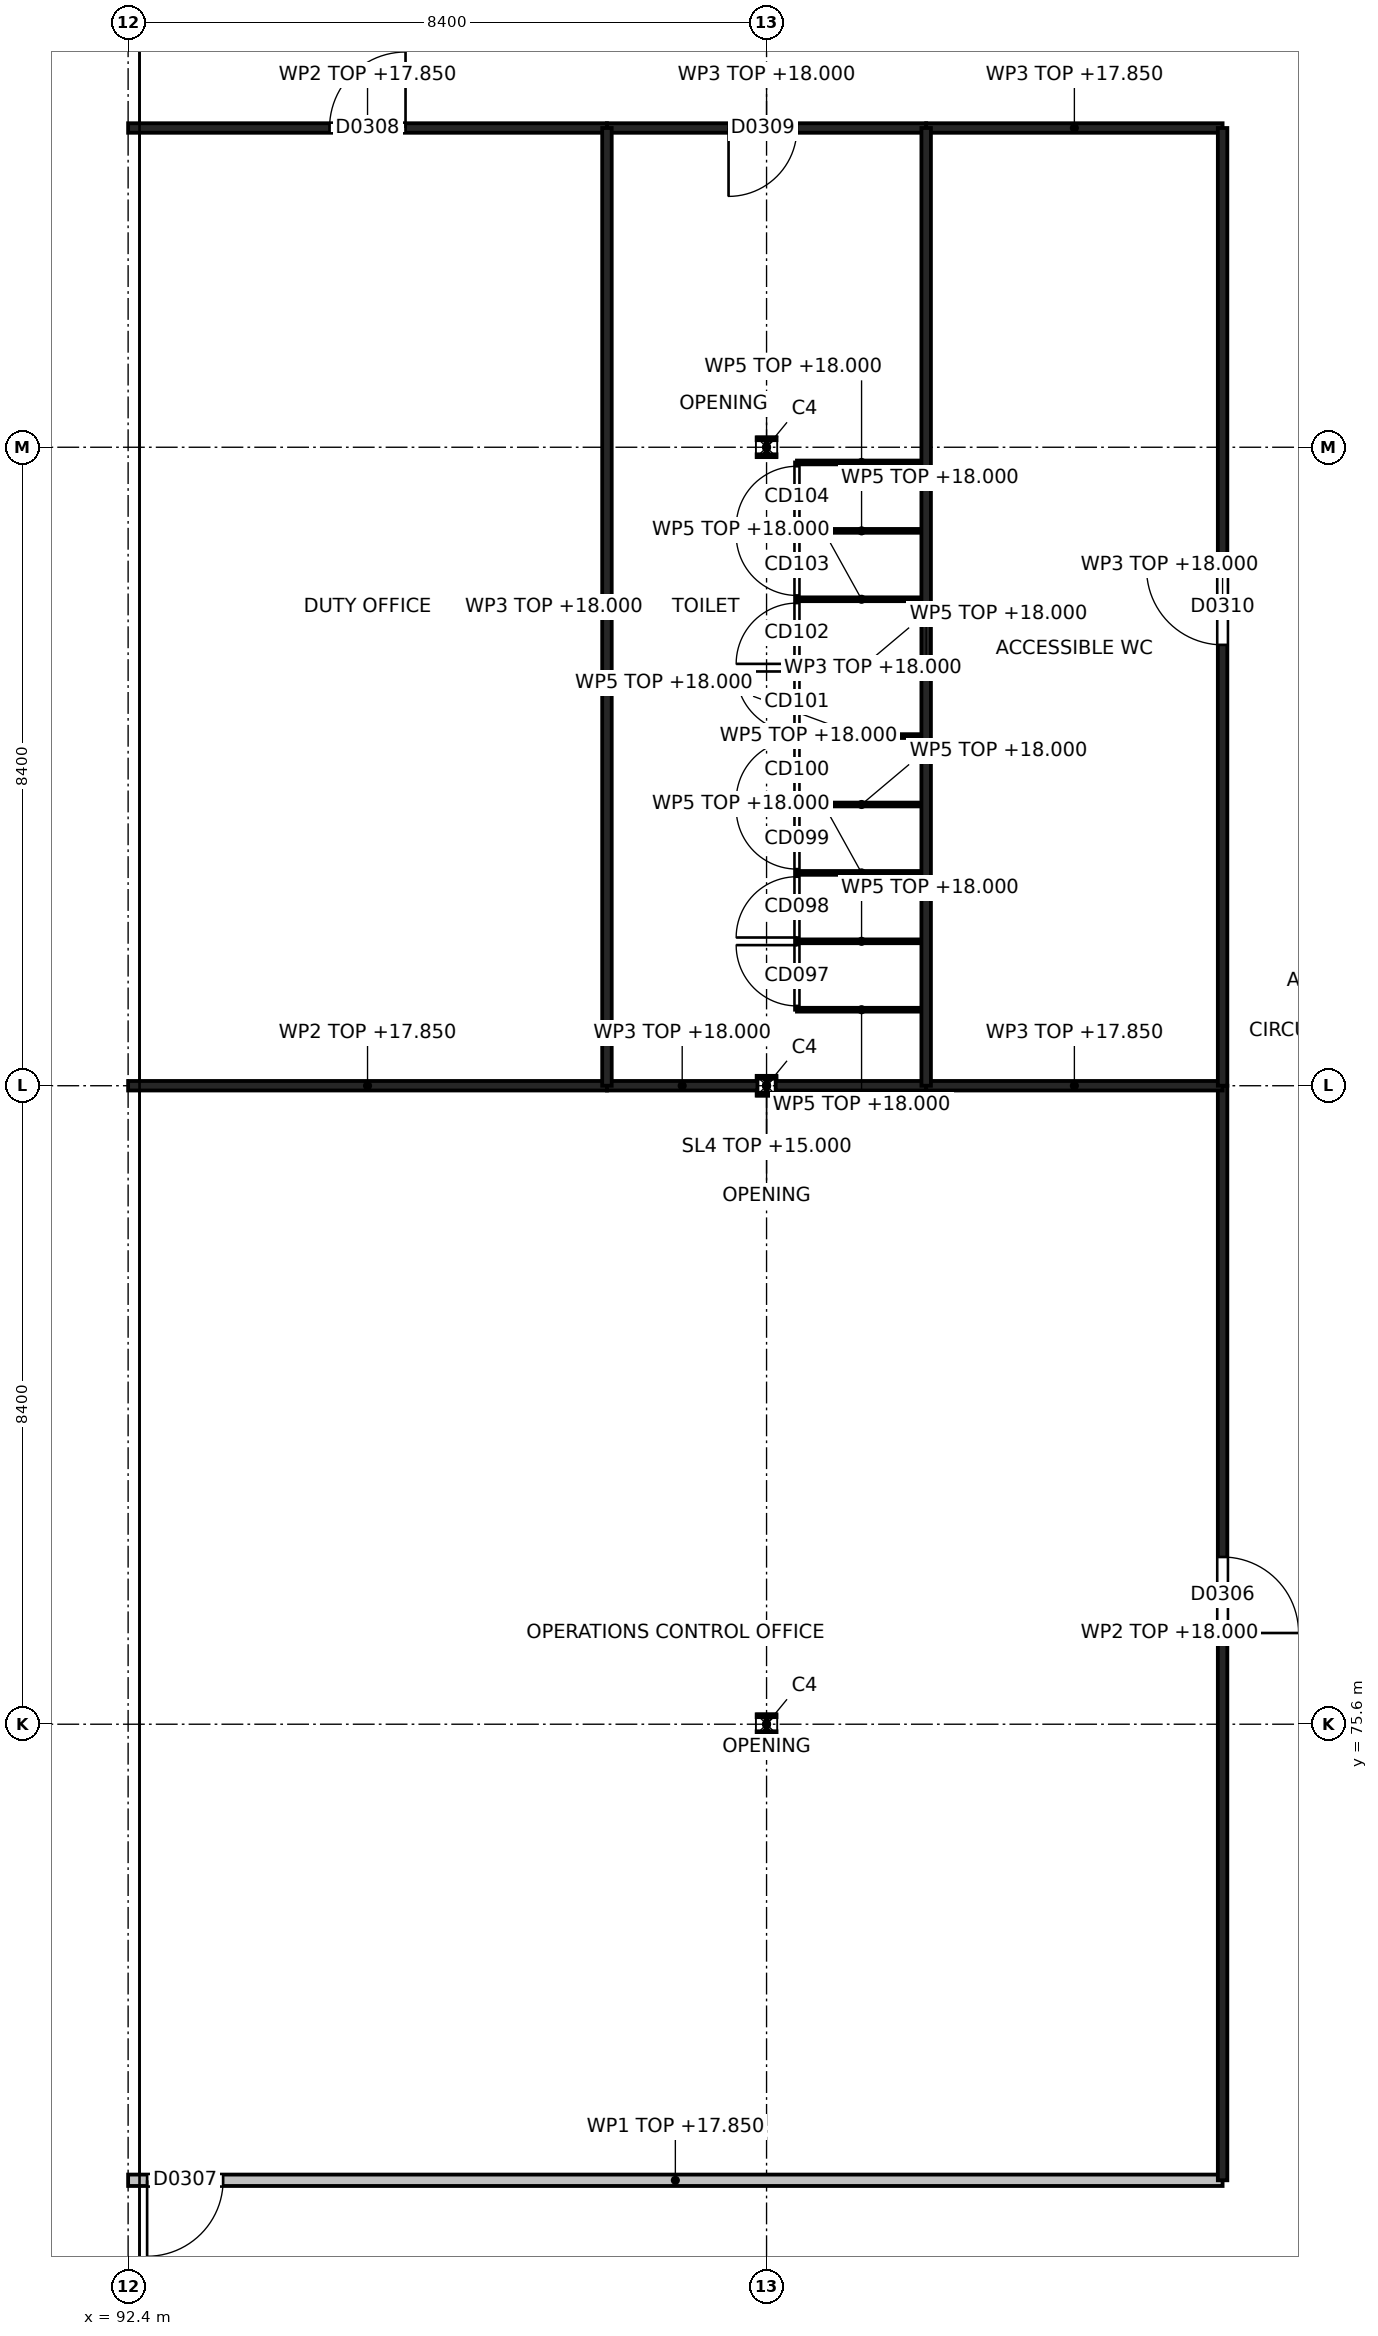
"""IFC4 building model, lengths in metres.
Left out: names, types, materials, properties, quantities, classifications, styles, units other than length and angle.
Written with IfcOpenShell. Run it as: python <this file> out.ifc"""

import sys

from ifc_helpers import new_model, si_unit, direction, frame, frame_2d, origin, origin_2d, place, context, subcontext, project, spatial, rectangle, i_section, extrude, element, fill, save


model = new_model("IFC4")
c1 = context("Model", 3, precision=1e-05, world=origin(), true_north=direction((0.0, 1.0)))
c2 = subcontext(c1, "Body", "Model", "MODEL_VIEW")
j1 = project(units=[si_unit("LENGTHUNIT", "METRE"), si_unit("PLANEANGLEUNIT", "RADIAN")], contexts=[c1])
p1 = place(None, origin())
s1 = spatial("IfcSite", under=j1, at=p1, CompositionType="ELEMENT")
p2 = place(p1, origin())
s2 = spatial("IfcBuilding", under=s1, at=p2, CompositionType="ELEMENT")
p3 = place(p2, frame((0.0, 0.0, 15.0)))
s3 = spatial("IfcBuildingStorey", under=s2, at=p3, CompositionType="ELEMENT", Elevation=15.0)
for number, where, z_axis, x_axis in (
    (1, (100.8, 75.6, 0.0), (0.0, 0.0, 1.0), (1.0, 0.0, 0.0)),
    (2, (100.8, 84.0, 0.0), (0.0, 0.0, 1.0), (1.0, 0.0, 0.0)),
    (3, (100.8, 92.4, 0.0), (0.0, 0.0, 1.0), (1.0, 0.0, 0.0)),
):
    element("IfcColumn", number, at=place(p3, frame(where, z_axis=z_axis, x_axis=x_axis)), inside=s3, PredefinedType="COLUMN", context=c2, shape_type="SweptSolid", body=[
        extrude(i_section(OverallWidth=0.24, OverallDepth=0.24, WebThickness=0.01, FlangeThickness=0.017, at=origin_2d()), origin(), (0.0, 0.0, 1.0), 3.31),
    ])
p4 = place(p3, frame((92.4, 69.6, 0.0), z_axis=(0.0, 0.0, 1.0), x_axis=(1.0, 0.0, 0.0)))
e4 = element("IfcWall", 4, at=p4, inside=s3, PredefinedType="PARTITIONING", context=c2, shape_type="SweptSolid", body=[
    extrude(rectangle(XDim=14.4, YDim=0.15, at=frame_2d((7.2, 0.0))), origin(), (0.0, 0.0, 1.0), 2.85),
])
p5 = place(p4, frame((0.25, 0.0, 0.0)))
e5 = element("IfcOpeningElement", 5, at=p5, cuts=e4, PredefinedType="OPENING", context=c2, shape_type="SweptSolid", body=[
    extrude(rectangle(XDim=1.0, YDim=2.2, at=frame_2d((0.5, 1.1))), frame((0.0, 0.075, 0.0), z_axis=(0.0, -1.0, 0.0), x_axis=(1.0, 0.0, 0.0)), (0.0, 0.0, 1.0), 0.15),
])
p6 = place(p3, frame((106.8, 69.6, 0.0), z_axis=(0.0, 0.0, 1.0), x_axis=(0.0, 1.0, 0.0)))
e6 = element("IfcWall", 6, at=p6, inside=s3, PredefinedType="PARTITIONING", context=c2, shape_type="SweptSolid", body=[
    extrude(rectangle(XDim=14.4, YDim=0.125, at=frame_2d((7.2, 0.0))), origin(), (0.0, 0.0, 1.0), 3.0),
])
p7 = place(p6, frame((7.2, 0.0, 0.0)))
e7 = element("IfcOpeningElement", 7, at=p7, cuts=e6, PredefinedType="OPENING", context=c2, shape_type="SweptSolid", body=[
    extrude(rectangle(XDim=1.0, YDim=2.2, at=frame_2d((0.5, 1.1))), frame((0.0, 0.062, 0.0), z_axis=(0.0, -1.0, 0.0), x_axis=(1.0, 0.0, 0.0)), (0.0, 0.0, 1.0), 0.125),
])
p8 = place(p3, frame((92.4, 84.0, 0.0), z_axis=(0.0, 0.0, 1.0), x_axis=(1.0, 0.0, 0.0)))
e8 = element("IfcWall", 8, at=p8, inside=s3, PredefinedType="PARTITIONING", context=c2, shape_type="SweptSolid", body=[
    extrude(rectangle(XDim=6.3, YDim=0.125, at=frame_2d((3.15, 0.0))), origin(), (0.0, 0.0, 1.0), 2.85),
])
for number, where, z_axis, x_axis in (
    (9, (98.7, 84.0, 0.0), (0.0, 0.0, 1.0), (1.0, 0.0, 0.0)),
    (10, (100.92, 84.0, 0.0), (0.0, 0.0, 1.0), (1.0, 0.0, 0.0)),
):
    element("IfcWall", number, at=place(p3, frame(where, z_axis=z_axis, x_axis=x_axis)), inside=s3, PredefinedType="PARTITIONING", context=c2, shape_type="SweptSolid", body=[
        extrude(rectangle(XDim=1.98, YDim=0.125, at=frame_2d((0.99, 0.0))), origin(), (0.0, 0.0, 1.0), 3.0),
    ])
p9 = place(p3, frame((102.9, 84.0, 0.0), z_axis=(0.0, 0.0, 1.0), x_axis=(1.0, 0.0, 0.0)))
e11 = element("IfcWall", 11, at=p9, inside=s3, PredefinedType="PARTITIONING", context=c2, shape_type="SweptSolid", body=[
    extrude(rectangle(XDim=3.9, YDim=0.125, at=frame_2d((1.95, 0.0))), origin(), (0.0, 0.0, 1.0), 2.85),
])
p10 = place(p3, frame((92.4, 96.6, 0.0), z_axis=(0.0, 0.0, 1.0), x_axis=(1.0, 0.0, 0.0)))
e12 = element("IfcWall", 12, at=p10, inside=s3, PredefinedType="PARTITIONING", context=c2, shape_type="SweptSolid", body=[
    extrude(rectangle(XDim=6.3, YDim=0.125, at=frame_2d((3.15, 0.0))), origin(), (0.0, 0.0, 1.0), 2.85),
])
p11 = place(p10, frame((2.65, 0.0, 0.0)))
e13 = element("IfcOpeningElement", 13, at=p11, cuts=e12, PredefinedType="OPENING", context=c2, shape_type="SweptSolid", body=[
    extrude(rectangle(XDim=1.0, YDim=2.2, at=frame_2d((0.5, 1.1))), frame((0.0, 0.062, 0.0), z_axis=(0.0, -1.0, 0.0), x_axis=(1.0, 0.0, 0.0)), (0.0, 0.0, 1.0), 0.125),
])
p12 = place(p3, frame((98.7, 96.6, 0.0), z_axis=(0.0, 0.0, 1.0), x_axis=(1.0, 0.0, 0.0)))
e14 = element("IfcWall", 14, at=p12, inside=s3, PredefinedType="PARTITIONING", context=c2, shape_type="SweptSolid", body=[
    extrude(rectangle(XDim=4.2, YDim=0.125, at=frame_2d((2.1, 0.0))), origin(), (0.0, 0.0, 1.0), 3.0),
])
p13 = place(p12, frame((1.6, 0.0, 0.0)))
e15 = element("IfcOpeningElement", 15, at=p13, cuts=e14, PredefinedType="OPENING", context=c2, shape_type="SweptSolid", body=[
    extrude(rectangle(XDim=0.9, YDim=2.1, at=frame_2d((0.45, 1.05))), frame((0.0, 0.062, 0.0), z_axis=(0.0, -1.0, 0.0), x_axis=(1.0, 0.0, 0.0)), (0.0, 0.0, 1.0), 0.125),
])
p14 = place(p3, frame((102.9, 96.6, 0.0), z_axis=(0.0, 0.0, 1.0), x_axis=(1.0, 0.0, 0.0)))
e16 = element("IfcWall", 16, at=p14, inside=s3, PredefinedType="PARTITIONING", context=c2, shape_type="SweptSolid", body=[
    extrude(rectangle(XDim=3.9, YDim=0.125, at=frame_2d((1.95, 0.0))), origin(), (0.0, 0.0, 1.0), 2.85),
])
p15 = place(p3, frame((106.8, 84.0, 0.0), z_axis=(0.0, 0.0, 1.0), x_axis=(0.0, 1.0, 0.0)))
e17 = element("IfcWall", 17, at=p15, inside=s3, PredefinedType="PARTITIONING", context=c2, shape_type="SweptSolid", body=[
    extrude(rectangle(XDim=12.6, YDim=0.125, at=frame_2d((6.3, 0.0))), origin(), (0.0, 0.0, 1.0), 3.0),
])
p16 = place(p15, frame((5.8, 0.0, 0.0)))
e18 = element("IfcOpeningElement", 18, at=p16, cuts=e17, PredefinedType="OPENING", context=c2, shape_type="SweptSolid", body=[
    extrude(rectangle(XDim=1.0, YDim=2.1, at=frame_2d((0.5, 1.05))), frame((0.0, 0.062, 0.0), z_axis=(0.0, -1.0, 0.0), x_axis=(1.0, 0.0, 0.0)), (0.0, 0.0, 1.0), 0.125),
])
for number, where, z_axis, x_axis in (
    (19, (98.7, 84.0, 0.0), (0.0, 0.0, 1.0), (0.0, 1.0, 0.0)),
    (20, (102.9, 84.0, 0.0), (0.0, 0.0, 1.0), (0.0, 1.0, 0.0)),
):
    element("IfcWall", number, at=place(p3, frame(where, z_axis=z_axis, x_axis=x_axis)), inside=s3, PredefinedType="PARTITIONING", context=c2, shape_type="SweptSolid", body=[
        extrude(rectangle(XDim=12.6, YDim=0.125, at=frame_2d((6.3, 0.0))), origin(), (0.0, 0.0, 1.0), 3.0),
    ])
p17 = place(p3, frame((101.2, 85.0, 0.0), z_axis=(0.0, 0.0, 1.0), x_axis=(0.0, 1.0, 0.0)))
e21 = element("IfcWall", 21, at=p17, inside=s3, PredefinedType="PARTITIONING", context=c2, shape_type="SweptSolid", body=[
    extrude(rectangle(XDim=7.2, YDim=0.05, at=frame_2d((3.6, 0.0))), origin(), (0.0, 0.0, 1.0), 3.0),
])
p18 = place(p17, frame((0.05, 0.0, 0.0)))
e22 = element("IfcOpeningElement", 22, at=p18, cuts=e21, PredefinedType="OPENING", context=c2, shape_type="SweptSolid", body=[
    extrude(rectangle(XDim=0.8, YDim=2.0, at=frame_2d((0.4, 1.0))), frame((0.0, 0.025, 0.0), z_axis=(0.0, -1.0, 0.0), x_axis=(1.0, 0.0, 0.0)), (0.0, 0.0, 1.0), 0.05),
])
p19 = place(p17, frame((0.95, 0.0, 0.0)))
e23 = element("IfcOpeningElement", 23, at=p19, cuts=e21, PredefinedType="OPENING", context=c2, shape_type="SweptSolid", body=[
    extrude(rectangle(XDim=0.8, YDim=2.0, at=frame_2d((0.4, 1.0))), frame((0.0, 0.025, 0.0), z_axis=(0.0, -1.0, 0.0), x_axis=(1.0, 0.0, 0.0)), (0.0, 0.0, 1.0), 0.05),
])
p20 = place(p17, frame((1.85, 0.0, 0.0)))
e24 = element("IfcOpeningElement", 24, at=p20, cuts=e21, PredefinedType="OPENING", context=c2, shape_type="SweptSolid", body=[
    extrude(rectangle(XDim=0.8, YDim=2.0, at=frame_2d((0.4, 1.0))), frame((0.0, 0.025, 0.0), z_axis=(0.0, -1.0, 0.0), x_axis=(1.0, 0.0, 0.0)), (0.0, 0.0, 1.0), 0.05),
])
p21 = place(p17, frame((2.75, 0.0, 0.0)))
e25 = element("IfcOpeningElement", 25, at=p21, cuts=e21, PredefinedType="OPENING", context=c2, shape_type="SweptSolid", body=[
    extrude(rectangle(XDim=0.8, YDim=2.0, at=frame_2d((0.4, 1.0))), frame((0.0, 0.025, 0.0), z_axis=(0.0, -1.0, 0.0), x_axis=(1.0, 0.0, 0.0)), (0.0, 0.0, 1.0), 0.05),
])
p22 = place(p17, frame((3.65, 0.0, 0.0)))
e26 = element("IfcOpeningElement", 26, at=p22, cuts=e21, PredefinedType="OPENING", context=c2, shape_type="SweptSolid", body=[
    extrude(rectangle(XDim=0.8, YDim=2.0, at=frame_2d((0.4, 1.0))), frame((0.0, 0.025, 0.0), z_axis=(0.0, -1.0, 0.0), x_axis=(1.0, 0.0, 0.0)), (0.0, 0.0, 1.0), 0.05),
])
p23 = place(p17, frame((4.55, 0.0, 0.0)))
e27 = element("IfcOpeningElement", 27, at=p23, cuts=e21, PredefinedType="OPENING", context=c2, shape_type="SweptSolid", body=[
    extrude(rectangle(XDim=0.8, YDim=2.0, at=frame_2d((0.4, 1.0))), frame((0.0, 0.025, 0.0), z_axis=(0.0, -1.0, 0.0), x_axis=(1.0, 0.0, 0.0)), (0.0, 0.0, 1.0), 0.05),
])
p24 = place(p17, frame((5.45, 0.0, 0.0)))
e28 = element("IfcOpeningElement", 28, at=p24, cuts=e21, PredefinedType="OPENING", context=c2, shape_type="SweptSolid", body=[
    extrude(rectangle(XDim=0.8, YDim=2.0, at=frame_2d((0.4, 1.0))), frame((0.0, 0.025, 0.0), z_axis=(0.0, -1.0, 0.0), x_axis=(1.0, 0.0, 0.0)), (0.0, 0.0, 1.0), 0.05),
])
p25 = place(p17, frame((6.35, 0.0, 0.0)))
e29 = element("IfcOpeningElement", 29, at=p25, cuts=e21, PredefinedType="OPENING", context=c2, shape_type="SweptSolid", body=[
    extrude(rectangle(XDim=0.8, YDim=2.0, at=frame_2d((0.4, 1.0))), frame((0.0, 0.025, 0.0), z_axis=(0.0, -1.0, 0.0), x_axis=(1.0, 0.0, 0.0)), (0.0, 0.0, 1.0), 0.05),
])
for number, where, z_axis, x_axis in (
    (30, (102.9, 85.0, 0.0), (0.0, 0.0, 1.0), (-1.0, 0.0, 0.0)),
    (31, (102.9, 85.9, 0.0), (0.0, 0.0, 1.0), (-1.0, 0.0, 0.0)),
    (32, (102.9, 86.8, 0.0), (0.0, 0.0, 1.0), (-1.0, 0.0, 0.0)),
    (33, (102.9, 87.7, 0.0), (0.0, 0.0, 1.0), (-1.0, 0.0, 0.0)),
    (34, (102.9, 88.6, 0.0), (0.0, 0.0, 1.0), (-1.0, 0.0, 0.0)),
    (35, (102.9, 89.5, 0.0), (0.0, 0.0, 1.0), (-1.0, 0.0, 0.0)),
    (36, (102.9, 90.4, 0.0), (0.0, 0.0, 1.0), (-1.0, 0.0, 0.0)),
    (37, (102.9, 91.3, 0.0), (0.0, 0.0, 1.0), (-1.0, 0.0, 0.0)),
    (38, (102.9, 92.2, 0.0), (0.0, 0.0, 1.0), (-1.0, 0.0, 0.0)),
):
    element("IfcWall", number, at=place(p3, frame(where, z_axis=z_axis, x_axis=x_axis)), inside=s3, PredefinedType="PARTITIONING", context=c2, shape_type="SweptSolid", body=[
        extrude(rectangle(XDim=1.7, YDim=0.05, at=frame_2d((0.85, 0.0))), origin(), (0.0, 0.0, 1.0), 3.0),
    ])
p26 = place(p7, origin())
e39 = element("IfcDoor", 39, at=p26, inside=s3, OperationType="SINGLE_SWING_LEFT", PredefinedType="DOOR", context=c2, shape_type="SweptSolid", body=[
    extrude(rectangle(XDim=1.0, YDim=2.2, at=frame_2d((0.5, 1.1))), frame((0.0, 0.025, 0.0), z_axis=(0.0, -1.0, 0.0), x_axis=(1.0, 0.0, 0.0)), (0.0, 0.0, 1.0), 0.05),
])
fill(e7, e39)
p27 = place(p5, origin())
e40 = element("IfcDoor", 40, at=p27, inside=s3, OperationType="SINGLE_SWING_LEFT", PredefinedType="DOOR", context=c2, shape_type="SweptSolid", body=[
    extrude(rectangle(XDim=1.0, YDim=2.2, at=frame_2d((0.5, 1.1))), frame((0.0, 0.025, 0.0), z_axis=(0.0, -1.0, 0.0), x_axis=(1.0, 0.0, 0.0)), (0.0, 0.0, 1.0), 0.05),
])
fill(e5, e40)
p28 = place(p11, origin())
e41 = element("IfcDoor", 41, at=p28, inside=s3, OperationType="SINGLE_SWING_RIGHT", PredefinedType="DOOR", context=c2, shape_type="SweptSolid", body=[
    extrude(rectangle(XDim=1.0, YDim=2.2, at=frame_2d((0.5, 1.1))), frame((0.0, 0.025, 0.0), z_axis=(0.0, -1.0, 0.0), x_axis=(1.0, 0.0, 0.0)), (0.0, 0.0, 1.0), 0.05),
])
fill(e13, e41)
p29 = place(p13, origin())
e42 = element("IfcDoor", 42, at=p29, inside=s3, OperationType="SINGLE_SWING_LEFT", PredefinedType="DOOR", context=c2, shape_type="SweptSolid", body=[
    extrude(rectangle(XDim=0.9, YDim=2.1, at=frame_2d((0.45, 1.05))), frame((0.0, 0.025, 0.0), z_axis=(0.0, -1.0, 0.0), x_axis=(1.0, 0.0, 0.0)), (0.0, 0.0, 1.0), 0.05),
])
fill(e15, e42)
p30 = place(p16, origin())
e43 = element("IfcDoor", 43, at=p30, inside=s3, OperationType="SINGLE_SWING_RIGHT", PredefinedType="DOOR", context=c2, shape_type="SweptSolid", body=[
    extrude(rectangle(XDim=1.0, YDim=2.1, at=frame_2d((0.5, 1.05))), frame((0.0, 0.025, 0.0), z_axis=(0.0, -1.0, 0.0), x_axis=(1.0, 0.0, 0.0)), (0.0, 0.0, 1.0), 0.05),
])
fill(e18, e43)
p31 = place(p18, origin())
e44 = element("IfcDoor", 44, at=p31, inside=s3, OperationType="SINGLE_SWING_RIGHT", PredefinedType="DOOR", context=c2, shape_type="SweptSolid", body=[
    extrude(rectangle(XDim=0.8, YDim=2.0, at=frame_2d((0.4, 1.0))), frame((0.0, 0.025, 0.0), z_axis=(0.0, -1.0, 0.0), x_axis=(1.0, 0.0, 0.0)), (0.0, 0.0, 1.0), 0.05),
])
fill(e22, e44)
p32 = place(p19, origin())
e45 = element("IfcDoor", 45, at=p32, inside=s3, OperationType="SINGLE_SWING_LEFT", PredefinedType="DOOR", context=c2, shape_type="SweptSolid", body=[
    extrude(rectangle(XDim=0.8, YDim=2.0, at=frame_2d((0.4, 1.0))), frame((0.0, 0.025, 0.0), z_axis=(0.0, -1.0, 0.0), x_axis=(1.0, 0.0, 0.0)), (0.0, 0.0, 1.0), 0.05),
])
fill(e23, e45)
p33 = place(p20, origin())
e46 = element("IfcDoor", 46, at=p33, inside=s3, OperationType="SINGLE_SWING_RIGHT", PredefinedType="DOOR", context=c2, shape_type="SweptSolid", body=[
    extrude(rectangle(XDim=0.8, YDim=2.0, at=frame_2d((0.4, 1.0))), frame((0.0, 0.025, 0.0), z_axis=(0.0, -1.0, 0.0), x_axis=(1.0, 0.0, 0.0)), (0.0, 0.0, 1.0), 0.05),
])
fill(e24, e46)
p34 = place(p21, origin())
e47 = element("IfcDoor", 47, at=p34, inside=s3, OperationType="SINGLE_SWING_LEFT", PredefinedType="DOOR", context=c2, shape_type="SweptSolid", body=[
    extrude(rectangle(XDim=0.8, YDim=2.0, at=frame_2d((0.4, 1.0))), frame((0.0, 0.025, 0.0), z_axis=(0.0, -1.0, 0.0), x_axis=(1.0, 0.0, 0.0)), (0.0, 0.0, 1.0), 0.05),
])
fill(e25, e47)
p35 = place(p22, origin())
e48 = element("IfcDoor", 48, at=p35, inside=s3, OperationType="SINGLE_SWING_RIGHT", PredefinedType="DOOR", context=c2, shape_type="SweptSolid", body=[
    extrude(rectangle(XDim=0.8, YDim=2.0, at=frame_2d((0.4, 1.0))), frame((0.0, 0.025, 0.0), z_axis=(0.0, -1.0, 0.0), x_axis=(1.0, 0.0, 0.0)), (0.0, 0.0, 1.0), 0.05),
])
fill(e26, e48)
p36 = place(p23, origin())
e49 = element("IfcDoor", 49, at=p36, inside=s3, OperationType="SINGLE_SWING_LEFT", PredefinedType="DOOR", context=c2, shape_type="SweptSolid", body=[
    extrude(rectangle(XDim=0.8, YDim=2.0, at=frame_2d((0.4, 1.0))), frame((0.0, 0.025, 0.0), z_axis=(0.0, -1.0, 0.0), x_axis=(1.0, 0.0, 0.0)), (0.0, 0.0, 1.0), 0.05),
])
fill(e27, e49)
p37 = place(p24, origin())
e50 = element("IfcDoor", 50, at=p37, inside=s3, OperationType="SINGLE_SWING_RIGHT", PredefinedType="DOOR", context=c2, shape_type="SweptSolid", body=[
    extrude(rectangle(XDim=0.8, YDim=2.0, at=frame_2d((0.4, 1.0))), frame((0.0, 0.025, 0.0), z_axis=(0.0, -1.0, 0.0), x_axis=(1.0, 0.0, 0.0)), (0.0, 0.0, 1.0), 0.05),
])
fill(e28, e50)
p38 = place(p25, origin())
e51 = element("IfcDoor", 51, at=p38, inside=s3, OperationType="SINGLE_SWING_LEFT", PredefinedType="DOOR", context=c2, shape_type="SweptSolid", body=[
    extrude(rectangle(XDim=0.8, YDim=2.0, at=frame_2d((0.4, 1.0))), frame((0.0, 0.025, 0.0), z_axis=(0.0, -1.0, 0.0), x_axis=(1.0, 0.0, 0.0)), (0.0, 0.0, 1.0), 0.05),
])
fill(e29, e51)
save(model, sys.argv[1])
